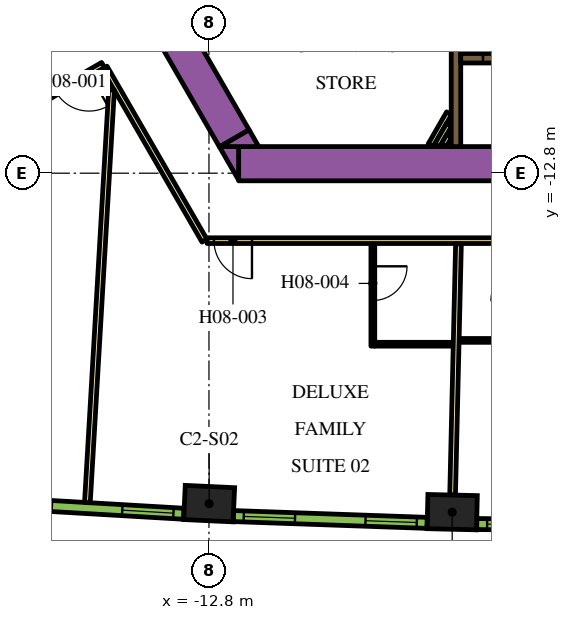
"""IFC4 building model, lengths in metres.
Left out: names, types, materials, properties, quantities, classifications, styles, units other than length and angle.
Written with IfcOpenShell. Run it as: python <this file> out.ifc"""

import sys

from ifc_helpers import new_model, si_unit, direction, frame, frame_2d, origin, origin_2d, place, context, subcontext, project, spatial, polyline, rectangle, outline, extrude, element, fill, save


model = new_model("IFC4")
c1 = context("Model", 3, precision=1e-05, world=origin(), true_north=direction((0.0, 1.0)))
c2 = subcontext(c1, "Body", "Model", "MODEL_VIEW")
j1 = project(units=[si_unit("LENGTHUNIT", "METRE"), si_unit("PLANEANGLEUNIT", "RADIAN")], contexts=[c1])
p1 = place(None, origin())
s1 = spatial("IfcSite", under=j1, at=p1, CompositionType="ELEMENT")
p2 = place(p1, origin())
s2 = spatial("IfcBuilding", under=s1, at=p2, CompositionType="ELEMENT")
p3 = place(p2, frame((0.0, 0.0, 107.1)))
s3 = spatial("IfcBuildingStorey", under=s2, at=p3, CompositionType="ELEMENT", Elevation=107.1)
for number, where, z_axis, x_axis in (
    (1, (-12.795, -21.494, 0.0), (0.0, 0.0, 1.0), (0.999, -0.047, 0.0)),
    (2, (-6.399, -21.719, 0.0), (0.0, 0.0, 1.0), (1.0, -0.023, 0.0)),
):
    element("IfcColumn", number, at=place(p3, frame(where, z_axis=z_axis, x_axis=x_axis)), inside=s3, PredefinedType="COLUMN", context=c2, shape_type="SweptSolid", body=[
        extrude(rectangle(XDim=1.3, YDim=0.9, at=origin_2d()), origin(), (0.0, 0.0, 1.0), 3.9),
    ])
p4 = place(p3, frame((-12.019, -12.55, 0.0), z_axis=(0.0, 0.0, 1.0), x_axis=(1.0, 0.0, 0.0)))
e3 = element("IfcWall", 3, at=p4, inside=s3, PredefinedType="SOLIDWALL", context=c2, shape_type="SweptSolid", body=[
    extrude(rectangle(XDim=21.63, YDim=0.9, at=frame_2d((10.815, 0.0))), origin(), (0.0, 0.0, 1.0), 3.9),
])
p5 = place(p3, origin())
e4 = element("IfcWall", 4, at=p5, inside=s3, PredefinedType="SOLIDWALL", context=c2, shape_type="SweptSolid", body=[
    extrude(outline(polyline([(-12.529, -12.1), (-12.021, -12.1), (-12.021, -12.98), (-12.529, -12.1)])), origin(), (0.0, 0.0, 1.0), 3.9),
])
p6 = place(p3, frame((-12.134, -11.883, 0.0), z_axis=(0.0, 0.0, 1.0), x_axis=(-0.500005339912, 0.866022320763, 0.0)))
e5 = element("IfcWall", 5, at=p6, inside=s3, PredefinedType="SOLIDWALL", context=c2, shape_type="SweptSolid", body=[
    extrude(rectangle(XDim=9.488, YDim=0.9, at=frame_2d((4.744, 0.0))), origin(), (0.0, 0.0, 1.0), 3.9),
])
e6 = element("IfcWall", 6, at=p5, inside=s3, PredefinedType="SOLIDWALL", context=c2, shape_type="SweptSolid", body=[
    extrude(outline(polyline([(-11.489, -12.1), (-12.505, -12.1), (-11.743, -11.66), (-11.489, -12.1)])), origin(), (0.0, 0.0, 1.0), 3.9),
])
p7 = place(p3, frame((-6.3, -12.1, 0.0), z_axis=(0.0, 0.0, 1.0), x_axis=(0.0, 1.0, 0.0)))
e7 = element("IfcWall", 7, at=p7, inside=s3, PredefinedType="SOLIDWALL", context=c2, shape_type="SweptSolid", body=[
    extrude(rectangle(XDim=3.146, YDim=0.25, at=frame_2d((1.573, 0.0))), origin(), (0.0, 0.0, 1.0), 3.9),
])
p8 = place(p3, frame((-6.968, -12.068, 0.0), z_axis=(0.0, 0.0, 1.0), x_axis=(0.49998975084, 0.866031321059, 0.0)))
e8 = element("IfcWall", 8, at=p8, inside=s3, PredefinedType="PARTITIONING", context=c2, shape_type="SweptSolid", body=[
    extrude(rectangle(XDim=0.975, YDim=0.15, at=frame_2d((0.488, 0.0))), origin(), (0.0, 0.0, 1.0), 2.75),
])
p9 = place(p3, frame((-6.794, -12.068, 0.0), z_axis=(0.0, 0.0, 1.0), x_axis=(0.49985693963, 0.866107983974, 0.0)))
e9 = element("IfcWall", 9, at=p9, inside=s3, PredefinedType="PARTITIONING", context=c2, shape_type="SweptSolid", body=[
    extrude(rectangle(XDim=0.629, YDim=0.15, at=frame_2d((0.314, 0.0))), origin(), (0.0, 0.0, 1.0), 2.75),
])
p10 = place(p3, frame((-6.621, -12.068, 0.0), z_axis=(0.0, 0.0, 1.0), x_axis=(0.500046963369, 0.865998287773, 0.0)))
e10 = element("IfcWall", 10, at=p10, inside=s3, PredefinedType="PARTITIONING", context=c2, shape_type="SweptSolid", body=[
    extrude(rectangle(XDim=0.282, YDim=0.15, at=frame_2d((0.141, 0.0))), origin(), (0.0, 0.0, 1.0), 2.75),
])
p11 = place(p3, frame((-6.175, -9.775, 0.0), z_axis=(0.0, 0.0, 1.0), x_axis=(1.0, 0.0, 0.0)))
e11 = element("IfcWall", 11, at=p11, inside=s3, PredefinedType="SOLIDWALL", context=c2, shape_type="SweptSolid", body=[
    extrude(rectangle(XDim=12.35, YDim=0.25, at=frame_2d((6.175, 0.0))), origin(), (0.0, 0.0, 1.0), 3.9),
])
p12 = place(p11, frame((0.585, 0.0, 0.0)))
e12 = element("IfcOpeningElement", 12, at=p12, cuts=e11, PredefinedType="OPENING", context=c2, shape_type="SweptSolid", body=[
    extrude(rectangle(XDim=1.1, YDim=2.1, at=frame_2d((0.55, 1.05))), frame((0.0, 0.135, 0.0), z_axis=(0.0, -1.0, 0.0), x_axis=(1.0, 0.0, 0.0)), (0.0, 0.0, 1.0), 0.27),
])
p13 = place(p11, frame((3.105, 0.0, 0.0)))
e13 = element("IfcOpeningElement", 13, at=p13, cuts=e11, PredefinedType="OPENING", context=c2, shape_type="SweptSolid", body=[
    extrude(rectangle(XDim=1.1, YDim=2.1, at=frame_2d((0.55, 1.05))), frame((0.0, 0.135, 0.0), z_axis=(0.0, -1.0, 0.0), x_axis=(1.0, 0.0, 0.0)), (0.0, 0.0, 1.0), 0.27),
])
p14 = place(p11, frame((5.625, 0.0, 0.0)))
e14 = element("IfcOpeningElement", 14, at=p14, cuts=e11, PredefinedType="OPENING", context=c2, shape_type="SweptSolid", body=[
    extrude(rectangle(XDim=1.1, YDim=2.1, at=frame_2d((0.55, 1.05))), frame((0.0, 0.135, 0.0), z_axis=(0.0, -1.0, 0.0), x_axis=(1.0, 0.0, 0.0)), (0.0, 0.0, 1.0), 0.27),
])
p15 = place(p11, frame((8.145, 0.0, 0.0)))
e15 = element("IfcOpeningElement", 15, at=p15, cuts=e11, PredefinedType="OPENING", context=c2, shape_type="SweptSolid", body=[
    extrude(rectangle(XDim=1.1, YDim=2.1, at=frame_2d((0.55, 1.05))), frame((0.0, 0.135, 0.0), z_axis=(0.0, -1.0, 0.0), x_axis=(1.0, 0.0, 0.0)), (0.0, 0.0, 1.0), 0.27),
])
p16 = place(p11, frame((10.665, 0.0, 0.0)))
e16 = element("IfcOpeningElement", 16, at=p16, cuts=e11, PredefinedType="OPENING", context=c2, shape_type="SweptSolid", body=[
    extrude(rectangle(XDim=1.1, YDim=2.1, at=frame_2d((0.55, 1.05))), frame((0.0, 0.135, 0.0), z_axis=(0.0, -1.0, 0.0), x_axis=(1.0, 0.0, 0.0)), (0.0, 0.0, 1.0), 0.27),
])
p17 = place(p3, frame((-28.211, -15.335, 0.0), z_axis=(0.0, 0.0, 1.0), x_axis=(0.866025884867, 0.49999916674, 0.0)))
e17 = element("IfcWall", 17, at=p17, inside=s3, PredefinedType="PARTITIONING", context=c2, shape_type="SweptSolid", body=[
    extrude(rectangle(XDim=13.543, YDim=0.15, at=frame_2d((6.772, 0.0))), origin(), (0.0, 0.0, 1.0), 2.75),
])
p18 = place(p17, frame((12.114, 0.0, 0.0)))
e18 = element("IfcOpeningElement", 18, at=p18, cuts=e17, PredefinedType="OPENING", context=c2, shape_type="SweptSolid", body=[
    extrude(rectangle(XDim=1.1, YDim=2.1, at=frame_2d((0.55, 1.05))), frame((0.0, 0.085, 0.0), z_axis=(0.0, -1.0, 0.0), x_axis=(1.0, 0.0, 0.0)), (0.0, 0.0, 1.0), 0.17),
])
p19 = place(p17, frame((4.65, 0.0, 0.0)))
e19 = element("IfcOpeningElement", 19, at=p19, cuts=e17, PredefinedType="OPENING", context=c2, shape_type="SweptSolid", body=[
    extrude(rectangle(XDim=1.0, YDim=2.1, at=frame_2d((0.5, 1.05))), frame((0.0, 0.085, 0.0), z_axis=(0.0, -1.0, 0.0), x_axis=(1.0, 0.0, 0.0)), (0.0, 0.0, 1.0), 0.17),
])
p20 = place(p3, frame((-15.587, -9.952, 0.0), z_axis=(0.0, 0.0, 1.0), x_axis=(-0.866017869832, -0.500013048961, 0.0)))
e20 = element("IfcWall", 20, at=p20, inside=s3, PredefinedType="PARTITIONING", context=c2, shape_type="SweptSolid", body=[
    extrude(rectangle(XDim=13.624, YDim=0.15, at=frame_2d((6.812, 0.0))), origin(), (0.0, 0.0, 1.0), 2.75),
])
p21 = place(p20, frame((0.427, 0.0, 0.0)))
e21 = element("IfcOpeningElement", 21, at=p21, cuts=e20, PredefinedType="OPENING", context=c2, shape_type="SweptSolid", body=[
    extrude(rectangle(XDim=1.0, YDim=2.1, at=frame_2d((0.5, 1.05))), frame((0.0, 0.085, 0.0), z_axis=(0.0, -1.0, 0.0), x_axis=(1.0, 0.0, 0.0)), (0.0, 0.0, 1.0), 0.17),
])
p22 = place(p3, frame((-12.918, -14.575, 0.0), z_axis=(0.0, 0.0, 1.0), x_axis=(-0.500009150678, 0.866020120573, 0.0)))
e22 = element("IfcWall", 22, at=p22, inside=s3, PredefinedType="PARTITIONING", context=c2, shape_type="SweptSolid", body=[
    extrude(rectangle(XDim=5.258, YDim=0.15, at=frame_2d((2.629, 0.0))), origin(), (0.0, 0.0, 1.0), 2.75),
])
p23 = place(p3, frame((12.918, -14.575, 0.0), z_axis=(0.0, 0.0, 1.0), x_axis=(-1.0, 0.0, 0.0)))
e23 = element("IfcWall", 23, at=p23, inside=s3, PredefinedType="PARTITIONING", context=c2, shape_type="SweptSolid", body=[
    extrude(rectangle(XDim=25.766, YDim=0.15, at=frame_2d((12.883, 0.0))), origin(), (0.0, 0.0, 1.0), 2.75),
])
p24 = place(p23, frame((24.586, 0.0, 0.0)))
e24 = element("IfcOpeningElement", 24, at=p24, cuts=e23, PredefinedType="OPENING", context=c2, shape_type="SweptSolid", body=[
    extrude(rectangle(XDim=1.0, YDim=2.1, at=frame_2d((0.5, 1.05))), frame((0.0, 0.085, 0.0), z_axis=(0.0, -1.0, 0.0), x_axis=(1.0, 0.0, 0.0)), (0.0, 0.0, 1.0), 0.17),
])
p25 = place(p23, frame((13.144, 0.0, 0.0)))
e25 = element("IfcOpeningElement", 25, at=p25, cuts=e23, PredefinedType="OPENING", context=c2, shape_type="SweptSolid", body=[
    extrude(rectangle(XDim=1.0, YDim=2.1, at=frame_2d((0.5, 1.05))), frame((0.0, 0.085, 0.0), z_axis=(0.0, -1.0, 0.0), x_axis=(1.0, 0.0, 0.0)), (0.0, 0.0, 1.0), 0.17),
])
p26 = place(p23, frame((10.874, 0.0, 0.0)))
e26 = element("IfcOpeningElement", 26, at=p26, cuts=e23, PredefinedType="OPENING", context=c2, shape_type="SweptSolid", body=[
    extrude(rectangle(XDim=0.9, YDim=2.1, at=frame_2d((0.45, 1.05))), frame((0.0, 0.085, 0.0), z_axis=(0.0, -1.0, 0.0), x_axis=(1.0, 0.0, 0.0)), (0.0, 0.0, 1.0), 0.17),
])
p27 = place(p23, frame((0.596, 0.0, 0.0)))
e27 = element("IfcOpeningElement", 27, at=p27, cuts=e23, PredefinedType="OPENING", context=c2, shape_type="SweptSolid", body=[
    extrude(rectangle(XDim=1.0, YDim=2.1, at=frame_2d((0.5, 1.05))), frame((0.0, 0.085, 0.0), z_axis=(0.0, -1.0, 0.0), x_axis=(1.0, 0.0, 0.0)), (0.0, 0.0, 1.0), 0.17),
])
p28 = place(p3, frame((-15.999, -21.467, 0.0), z_axis=(0.0, 0.0, 1.0), x_axis=(0.058411453297, 0.998292593443, 0.0)))
e28 = element("IfcWall", 28, at=p28, inside=s3, PredefinedType="PARTITIONING", context=c2, shape_type="SweptSolid", body=[
    extrude(rectangle(XDim=10.875, YDim=0.15, at=frame_2d((5.438, 0.0))), origin(), (0.0, 0.0, 1.0), 2.75),
])
p29 = place(p3, frame((-6.389, -21.269, 0.0), z_axis=(0.0, 0.0, 1.0), x_axis=(0.023377429176, 0.999726710559, 0.0)))
e29 = element("IfcWall", 29, at=p29, inside=s3, PredefinedType="PARTITIONING", context=c2, shape_type="SweptSolid", body=[
    extrude(rectangle(XDim=6.611, YDim=0.15, at=frame_2d((3.305, 0.0))), origin(), (0.0, 0.0, 1.0), 2.75),
])
p30 = place(p3, frame((-8.488, -14.65, 0.0), z_axis=(0.0, 0.0, 1.0), x_axis=(0.0, -1.0, 0.0)))
e30 = element("IfcWall", 30, at=p30, inside=s3, PredefinedType="PARTITIONING", context=c2, shape_type="SweptSolid", body=[
    extrude(rectangle(XDim=2.7, YDim=0.1, at=frame_2d((1.35, 0.0))), origin(), (0.0, 0.0, 1.0), 2.75),
])
p31 = place(p30, frame((0.6, 0.0, 0.0)))
e31 = element("IfcOpeningElement", 31, at=p31, cuts=e30, PredefinedType="OPENING", context=c2, shape_type="SweptSolid", body=[
    extrude(rectangle(XDim=0.9, YDim=2.1, at=frame_2d((0.45, 1.05))), frame((0.0, 0.06, 0.0), z_axis=(0.0, -1.0, 0.0), x_axis=(1.0, 0.0, 0.0)), (0.0, 0.0, 1.0), 0.12),
])
p32 = place(p3, frame((-8.438, -17.3, 0.0), z_axis=(0.0, 0.0, 1.0), x_axis=(1.0, 0.0, 0.0)))
e32 = element("IfcWall", 32, at=p32, inside=s3, PredefinedType="PARTITIONING", context=c2, shape_type="SweptSolid", body=[
    extrude(rectangle(XDim=2.06, YDim=0.1, at=frame_2d((1.03, 0.0))), origin(), (0.0, 0.0, 1.0), 2.75),
])
p33 = place(p3, frame((-4.53, -17.2, 0.0), z_axis=(0.0, 0.0, 1.0), x_axis=(-1.0, 0.0, 0.0)))
e33 = element("IfcWall", 33, at=p33, inside=s3, PredefinedType="PARTITIONING", context=c2, shape_type="SweptSolid", body=[
    extrude(rectangle(XDim=1.68, YDim=0.1, at=frame_2d((0.84, 0.0))), origin(), (0.0, 0.0, 1.0), 2.75),
])
p34 = place(p3, frame((-18.553, -21.463, 0.0), z_axis=(0.0, 0.0, 1.0), x_axis=(0.998290511436, -0.058447025388, 0.0)))
e34 = element("IfcWall", 34, at=p34, inside=s3, PredefinedType="SOLIDWALL", context=c2, shape_type="SweptSolid", body=[
    extrude(rectangle(XDim=5.1, YDim=0.29, at=frame_2d((2.55, 0.0))), origin(), (0.0, 0.0, 1.0), 3.65),
])
p35 = place(p34, frame((0.273, 0.0, 0.9)))
e35 = element("IfcOpeningElement", 35, at=p35, cuts=e34, PredefinedType="OPENING", context=c2, shape_type="SweptSolid", body=[
    extrude(rectangle(XDim=1.35, YDim=2.15, at=frame_2d((0.675, 1.075))), frame((0.0, 0.155, 0.0), z_axis=(0.0, -1.0, 0.0), x_axis=(1.0, 0.0, 0.0)), (0.0, 0.0, 1.0), 0.31),
])
p36 = place(p34, frame((3.478, 0.0, 0.9)))
e36 = element("IfcOpeningElement", 36, at=p36, cuts=e34, PredefinedType="OPENING", context=c2, shape_type="SweptSolid", body=[
    extrude(rectangle(XDim=1.35, YDim=2.15, at=frame_2d((0.675, 1.075))), frame((0.0, 0.155, 0.0), z_axis=(0.0, -1.0, 0.0), x_axis=(1.0, 0.0, 0.0)), (0.0, 0.0, 1.0), 0.31),
])
p37 = place(p3, frame((-12.157, -21.822, 0.0), z_axis=(0.0, 0.0, 1.0), x_axis=(0.999385993957, -0.035037623812, 0.0)))
e37 = element("IfcWall", 37, at=p37, inside=s3, PredefinedType="SOLIDWALL", context=c2, shape_type="SweptSolid", body=[
    extrude(rectangle(XDim=5.101, YDim=0.29, at=frame_2d((2.55, 0.0))), origin(), (0.0, 0.0, 1.0), 3.65),
])
p38 = place(p37, frame((0.273, 0.0, 0.9)))
e38 = element("IfcOpeningElement", 38, at=p38, cuts=e37, PredefinedType="OPENING", context=c2, shape_type="SweptSolid", body=[
    extrude(rectangle(XDim=1.35, YDim=2.15, at=frame_2d((0.675, 1.075))), frame((0.0, 0.155, 0.0), z_axis=(0.0, -1.0, 0.0), x_axis=(1.0, 0.0, 0.0)), (0.0, 0.0, 1.0), 0.31),
])
p39 = place(p37, frame((3.478, 0.0, 0.9)))
e39 = element("IfcOpeningElement", 39, at=p39, cuts=e37, PredefinedType="OPENING", context=c2, shape_type="SweptSolid", body=[
    extrude(rectangle(XDim=1.35, YDim=2.15, at=frame_2d((0.675, 1.075))), frame((0.0, 0.155, 0.0), z_axis=(0.0, -1.0, 0.0), x_axis=(1.0, 0.0, 0.0)), (0.0, 0.0, 1.0), 0.31),
])
p40 = place(p3, frame((-5.753, -22.031, 0.0), z_axis=(0.0, 0.0, 1.0), x_axis=(0.999931786565, -0.011679992145, 0.0)))
e40 = element("IfcWall", 40, at=p40, inside=s3, PredefinedType="SOLIDWALL", context=c2, shape_type="SweptSolid", body=[
    extrude(rectangle(XDim=5.1, YDim=0.29, at=frame_2d((2.55, 0.0))), origin(), (0.0, 0.0, 1.0), 3.65),
])
p41 = place(p40, frame((0.272, 0.0, 0.9)))
e41 = element("IfcOpeningElement", 41, at=p41, cuts=e40, PredefinedType="OPENING", context=c2, shape_type="SweptSolid", body=[
    extrude(rectangle(XDim=1.35, YDim=2.15, at=frame_2d((0.675, 1.075))), frame((0.0, 0.155, 0.0), z_axis=(0.0, -1.0, 0.0), x_axis=(1.0, 0.0, 0.0)), (0.0, 0.0, 1.0), 0.31),
])
p42 = place(p40, frame((3.478, 0.0, 0.9)))
e42 = element("IfcOpeningElement", 42, at=p42, cuts=e40, PredefinedType="OPENING", context=c2, shape_type="SweptSolid", body=[
    extrude(rectangle(XDim=1.35, YDim=2.15, at=frame_2d((0.675, 1.075))), frame((0.0, 0.155, 0.0), z_axis=(0.0, -1.0, 0.0), x_axis=(1.0, 0.0, 0.0)), (0.0, 0.0, 1.0), 0.31),
])
p43 = place(p12, origin())
e43 = element("IfcDoor", 43, at=p43, inside=s3, OperationType="DOUBLE_DOOR_SLIDING", PredefinedType="DOOR", context=c2, shape_type="SweptSolid", body=[
    extrude(rectangle(XDim=1.1, YDim=2.1, at=frame_2d((0.55, 1.05))), frame((0.0, 0.025, 0.0), z_axis=(0.0, -1.0, 0.0), x_axis=(1.0, 0.0, 0.0)), (0.0, 0.0, 1.0), 0.05),
])
fill(e12, e43)
p44 = place(p21, origin())
e44 = element("IfcDoor", 44, at=p44, inside=s3, OperationType="SINGLE_SWING_LEFT", PredefinedType="DOOR", context=c2, shape_type="SweptSolid", body=[
    extrude(rectangle(XDim=1.0, YDim=2.1, at=frame_2d((0.5, 1.05))), frame((0.0, 0.025, 0.0), z_axis=(0.0, -1.0, 0.0), x_axis=(1.0, 0.0, 0.0)), (0.0, 0.0, 1.0), 0.05),
])
fill(e21, e44)
p45 = place(p24, origin())
e45 = element("IfcDoor", 45, at=p45, inside=s3, OperationType="SINGLE_SWING_RIGHT", PredefinedType="DOOR", context=c2, shape_type="SweptSolid", body=[
    extrude(rectangle(XDim=1.0, YDim=2.1, at=frame_2d((0.5, 1.05))), frame((0.0, 0.025, 0.0), z_axis=(0.0, -1.0, 0.0), x_axis=(1.0, 0.0, 0.0)), (0.0, 0.0, 1.0), 0.05),
])
fill(e24, e45)
p46 = place(p31, origin())
e46 = element("IfcDoor", 46, at=p46, inside=s3, OperationType="SINGLE_SWING_LEFT", PredefinedType="DOOR", context=c2, shape_type="SweptSolid", body=[
    extrude(rectangle(XDim=0.9, YDim=2.1, at=frame_2d((0.45, 1.05))), frame((0.0, 0.025, 0.0), z_axis=(0.0, -1.0, 0.0), x_axis=(1.0, 0.0, 0.0)), (0.0, 0.0, 1.0), 0.05),
])
fill(e31, e46)
p47 = place(p36, origin())
e47 = element("IfcWindow", 47, at=p47, inside=s3, PartitioningType="DOUBLE_PANEL_VERTICAL", PredefinedType="WINDOW", context=c2, shape_type="SweptSolid", body=[
    extrude(rectangle(XDim=1.35, YDim=2.15, at=frame_2d((0.675, 1.075))), frame((0.0, 0.015, 0.0), z_axis=(0.0, -1.0, 0.0), x_axis=(1.0, 0.0, 0.0)), (0.0, 0.0, 1.0), 0.06),
])
fill(e36, e47)
p48 = place(p38, origin())
e48 = element("IfcWindow", 48, at=p48, inside=s3, PartitioningType="DOUBLE_PANEL_VERTICAL", PredefinedType="WINDOW", context=c2, shape_type="SweptSolid", body=[
    extrude(rectangle(XDim=1.35, YDim=2.15, at=frame_2d((0.675, 1.075))), frame((0.0, 0.015, 0.0), z_axis=(0.0, -1.0, 0.0), x_axis=(1.0, 0.0, 0.0)), (0.0, 0.0, 1.0), 0.06),
])
fill(e38, e48)
p49 = place(p39, origin())
e49 = element("IfcWindow", 49, at=p49, inside=s3, PartitioningType="DOUBLE_PANEL_VERTICAL", PredefinedType="WINDOW", context=c2, shape_type="SweptSolid", body=[
    extrude(rectangle(XDim=1.35, YDim=2.15, at=frame_2d((0.675, 1.075))), frame((0.0, 0.015, 0.0), z_axis=(0.0, -1.0, 0.0), x_axis=(1.0, 0.0, 0.0)), (0.0, 0.0, 1.0), 0.06),
])
fill(e39, e49)
p50 = place(p41, origin())
e50 = element("IfcWindow", 50, at=p50, inside=s3, PartitioningType="DOUBLE_PANEL_VERTICAL", PredefinedType="WINDOW", context=c2, shape_type="SweptSolid", body=[
    extrude(rectangle(XDim=1.35, YDim=2.15, at=frame_2d((0.675, 1.075))), frame((0.0, 0.015, 0.0), z_axis=(0.0, -1.0, 0.0), x_axis=(1.0, 0.0, 0.0)), (0.0, 0.0, 1.0), 0.06),
])
fill(e41, e50)
save(model, sys.argv[1])
